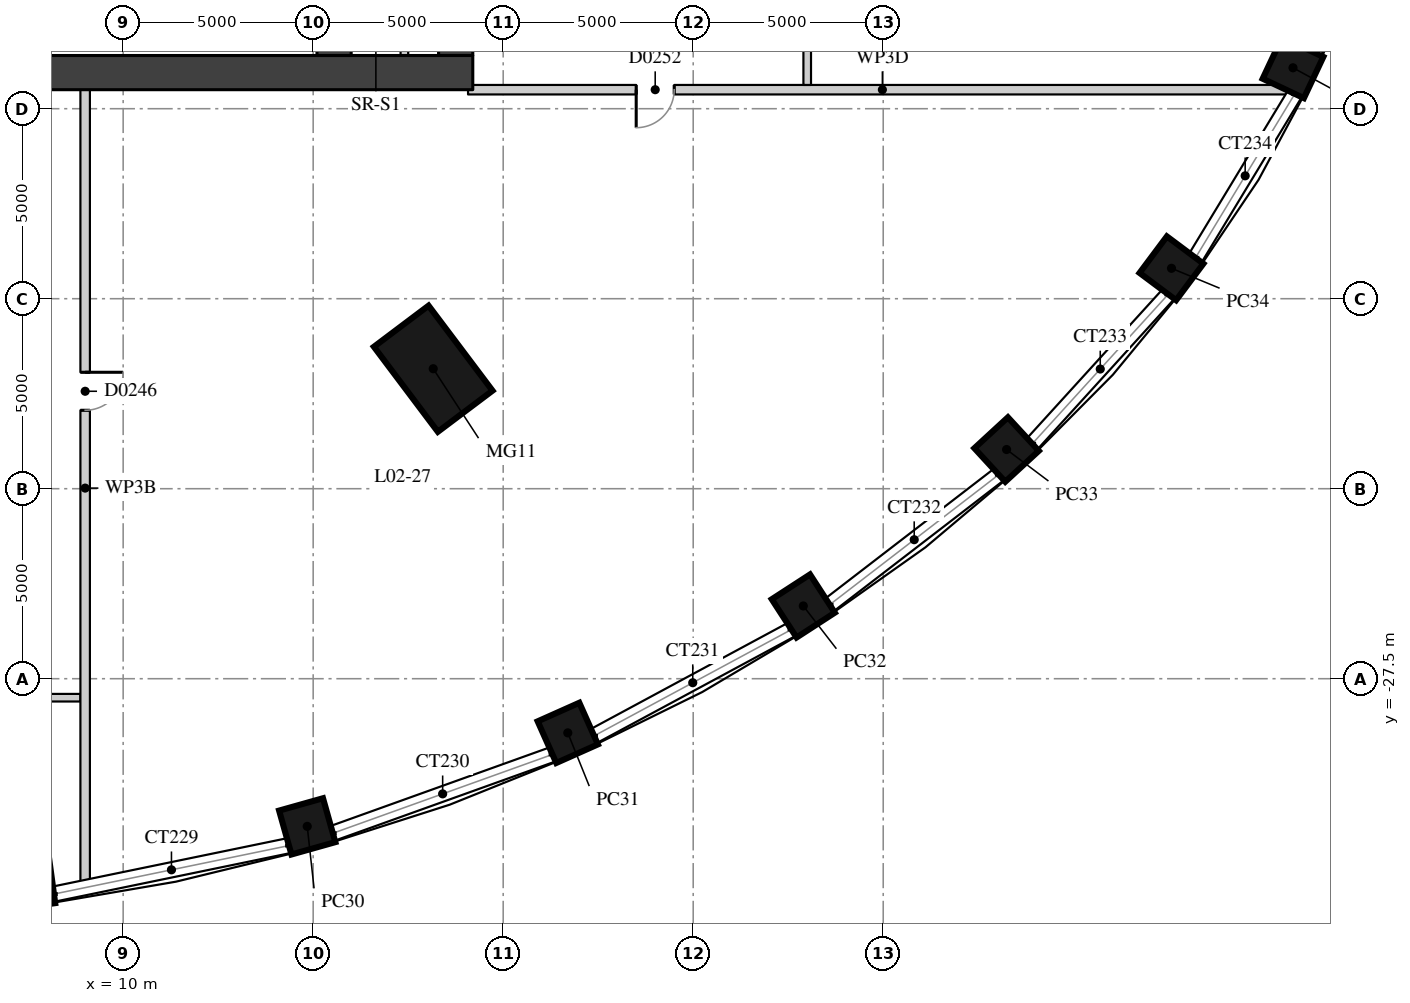
"""IFC4 building model, lengths in metres.
Left out: names, types, materials, properties, quantities, classifications, styles, units other than length and angle.
Written with IfcOpenShell. Run it as: python <this file> out.ifc"""

import sys

from ifc_helpers import new_model, si_unit, direction, frame, frame_2d, origin, origin_2d, place, context, subcontext, project, spatial, rectangle, extrude, element, fill, save


model = new_model("IFC4")
c1 = context("Model", 3, precision=1e-05, world=origin(), true_north=direction((0.0, 1.0)))
c2 = subcontext(c1, "Body", "Model", "MODEL_VIEW")
j1 = project(units=[si_unit("LENGTHUNIT", "METRE"), si_unit("PLANEANGLEUNIT", "RADIAN")], contexts=[c1])
p1 = place(None, origin())
s1 = spatial("IfcSite", under=j1, at=p1, CompositionType="ELEMENT")
p2 = place(p1, origin())
s2 = spatial("IfcBuilding", under=s1, at=p2, CompositionType="ELEMENT")
p3 = place(p2, frame((0.0, 0.0, 12.5)))
s3 = spatial("IfcBuildingStorey", under=s2, at=p3, CompositionType="ELEMENT", Elevation=12.5)
p4 = place(p3, frame((18.159, -19.343, 0.0), z_axis=(0.0, 0.0, 1.0), x_axis=(0.601173783055, -0.79911831575, 0.0)))
e1 = element("IfcColumn", 1, at=p4, inside=s3, PredefinedType="COLUMN", context=c2, shape_type="SweptSolid", body=[
    extrude(rectangle(XDim=2.8, YDim=1.8, at=origin_2d()), origin(), (0.0, 0.0, 1.0), 5.0),
])
for number, where, z_axis, x_axis in (
    (2, (7.536, -32.893, 0.0), (0.0, 0.0, 1.0), (0.135, -0.991, 0.0)),
    (3, (14.844, -31.386, 0.0), (0.0, 0.0, 1.0), (0.271, -0.963, 0.0)),
    (4, (21.7, -28.925, 0.0), (0.0, 0.0, 1.0), (0.407, -0.913, 0.0)),
    (5, (27.897, -25.586, 0.0), (0.0, 0.0, 1.0), (0.544, -0.839, 0.0)),
    (6, (33.246, -21.469, 0.0), (0.0, 0.0, 1.0), (0.677, -0.736, 0.0)),
    (7, (37.585, -16.7, 0.0), (0.0, 0.0, 1.0), (0.801, -0.599, 0.0)),
    (8, (40.783, -11.424, 0.0), (0.0, 0.0, 1.0), (0.905, -0.426, 0.0)),
):
    element("IfcColumn", number, at=place(p3, frame(where, z_axis=z_axis, x_axis=x_axis)), inside=s3, PredefinedType="COLUMN", context=c2, shape_type="SweptSolid", body=[
        extrude(rectangle(XDim=1.2, YDim=1.2, at=origin_2d()), origin(), (0.0, 0.0, 1.0), 5.0),
    ])
p5 = place(p3, frame((18.75, -11.1, 0.0), z_axis=(0.0, 0.0, 1.0), x_axis=(0.0, 1.0, 0.0)))
e9 = element("IfcWall", 9, at=p5, inside=s3, PredefinedType="SHEAR", context=c2, shape_type="SweptSolid", body=[
    extrude(rectangle(XDim=22.2, YDim=0.9, at=frame_2d((11.1, 0.0))), origin(), (0.0, 0.0, 1.0), 4.65),
])
p6 = place(p3, frame((4.0, -11.55, 0.0), z_axis=(0.0, 0.0, 1.0), x_axis=(1.0, 0.0, 0.0)))
e10 = element("IfcWall", 10, at=p6, inside=s3, PredefinedType="SHEAR", context=c2, shape_type="SweptSolid", body=[
    extrude(rectangle(XDim=15.2, YDim=0.9, at=frame_2d((7.6, 0.0))), origin(), (0.0, 0.0, 1.0), 4.65),
])
p7 = place(p3, frame((15.55, -11.1, 0.0), z_axis=(0.0, 0.0, 1.0), x_axis=(0.0, 1.0, 0.0)))
e11 = element("IfcWall", 11, at=p7, inside=s3, PredefinedType="SHEAR", context=c2, shape_type="SweptSolid", body=[
    extrude(rectangle(XDim=22.2, YDim=0.9, at=frame_2d((11.1, 0.0))), origin(), (0.0, 0.0, 1.0), 4.65),
])
p8 = place(p7, frame((15.6, 0.0, 0.0)))
e12 = element("IfcOpeningElement", 12, at=p8, cuts=e11, PredefinedType="OPENING", context=c2, shape_type="SweptSolid", body=[
    extrude(rectangle(XDim=1.0, YDim=2.1, at=frame_2d((0.5, 1.05))), frame((0.0, 0.46, 0.0), z_axis=(0.0, -1.0, 0.0), x_axis=(1.0, 0.0, 0.0)), (0.0, 0.0, 1.0), 0.92),
])
p9 = place(p7, frame((5.6, 0.0, 0.0)))
e13 = element("IfcOpeningElement", 13, at=p9, cuts=e11, PredefinedType="OPENING", context=c2, shape_type="SweptSolid", body=[
    extrude(rectangle(XDim=1.0, YDim=2.1, at=frame_2d((0.5, 1.05))), frame((0.0, 0.46, 0.0), z_axis=(0.0, -1.0, 0.0), x_axis=(1.0, 0.0, 0.0)), (0.0, 0.0, 1.0), 0.92),
])
p10 = place(p3, frame((17.4, -11.1, 0.0), z_axis=(0.0, 0.0, 1.0), x_axis=(0.0, 1.0, 0.0)))
e14 = element("IfcWall", 14, at=p10, inside=s3, PredefinedType="PARTITIONING", context=c2, shape_type="SweptSolid", body=[
    extrude(rectangle(XDim=4.2, YDim=0.2, at=frame_2d((2.1, 0.0))), origin(), (0.0, 0.0, 1.0), 4.65),
])
p11 = place(p3, frame((0.61, -28.0, 0.0), z_axis=(0.0, 0.0, 1.0), x_axis=(1.0, 0.0, 0.0)))
e15 = element("IfcWall", 15, at=p11, inside=s3, PredefinedType="PARTITIONING", context=c2, shape_type="SweptSolid", body=[
    extrude(rectangle(XDim=8.265, YDim=0.2, at=frame_2d((4.132, 0.0))), origin(), (0.0, 0.0, 1.0), 4.65),
])
p12 = place(p11, frame((3.633, 0.0, 0.0)))
e16 = element("IfcOpeningElement", 16, at=p12, cuts=e15, PredefinedType="OPENING", context=c2, shape_type="SweptSolid", body=[
    extrude(rectangle(XDim=1.0, YDim=2.1, at=frame_2d((0.5, 1.05))), frame((0.0, 0.11, 0.0), z_axis=(0.0, -1.0, 0.0), x_axis=(1.0, 0.0, 0.0)), (0.0, 0.0, 1.0), 0.22),
])
p13 = place(p3, frame((19.075, -12.0, 0.0), z_axis=(0.0, 0.0, 1.0), x_axis=(1.0, 0.0, 0.0)))
e17 = element("IfcWall", 17, at=p13, inside=s3, PredefinedType="PARTITIONING", context=c2, shape_type="SweptSolid", body=[
    extrude(rectangle(XDim=21.806, YDim=0.25, at=frame_2d((10.903, 0.0))), origin(), (0.0, 0.0, 1.0), 3.75),
])
p14 = place(p13, frame((4.425, 0.0, 0.0)))
e18 = element("IfcOpeningElement", 18, at=p14, cuts=e17, PredefinedType="OPENING", context=c2, shape_type="SweptSolid", body=[
    extrude(rectangle(XDim=1.0, YDim=2.1, at=frame_2d((0.5, 1.05))), frame((0.0, 0.135, 0.0), z_axis=(0.0, -1.0, 0.0), x_axis=(1.0, 0.0, 0.0)), (0.0, 0.0, 1.0), 0.27),
])
p15 = place(p3, frame((9.0, -32.97, 0.0), z_axis=(0.0, 0.0, 1.0), x_axis=(0.0, 1.0, 0.0)))
e19 = element("IfcWall", 19, at=p15, inside=s3, PredefinedType="PARTITIONING", context=c2, shape_type="SweptSolid", body=[
    extrude(rectangle(XDim=20.972, YDim=0.25, at=frame_2d((10.486, 0.0))), origin(), (0.0, 0.0, 1.0), 4.1),
])
p16 = place(p15, frame((12.534, 0.0, 0.0)))
e20 = element("IfcOpeningElement", 20, at=p16, cuts=e19, PredefinedType="OPENING", context=c2, shape_type="SweptSolid", body=[
    extrude(rectangle(XDim=1.0, YDim=2.1, at=frame_2d((0.5, 1.05))), frame((0.0, 0.135, 0.0), z_axis=(0.0, -1.0, 0.0), x_axis=(1.0, 0.0, 0.0)), (0.0, 0.0, 1.0), 0.27),
])
p17 = place(p3, frame((28.0, -11.875, 0.0), z_axis=(0.0, 0.0, 1.0), x_axis=(0.0, 1.0, 0.0)))
e21 = element("IfcWall", 21, at=p17, inside=s3, PredefinedType="PARTITIONING", context=c2, shape_type="SweptSolid", body=[
    extrude(rectangle(XDim=3.198, YDim=0.2, at=frame_2d((1.599, 0.0))), origin(), (0.0, 0.0, 1.0), 4.65),
])
p18 = place(p16, origin())
e22 = element("IfcDoor", 22, at=p18, inside=s3, OperationType="SINGLE_SWING_LEFT", PredefinedType="DOOR", context=c2, shape_type="SweptSolid", body=[
    extrude(rectangle(XDim=1.0, YDim=2.1, at=frame_2d((0.5, 1.05))), frame((0.0, 0.025, 0.0), z_axis=(0.0, -1.0, 0.0), x_axis=(1.0, 0.0, 0.0)), (0.0, 0.0, 1.0), 0.05),
])
fill(e20, e22)
p19 = place(p14, origin())
e23 = element("IfcDoor", 23, at=p19, inside=s3, OperationType="SINGLE_SWING_RIGHT", PredefinedType="DOOR", context=c2, shape_type="SweptSolid", body=[
    extrude(rectangle(XDim=1.0, YDim=2.1, at=frame_2d((0.5, 1.05))), frame((0.0, 0.025, 0.0), z_axis=(0.0, -1.0, 0.0), x_axis=(1.0, 0.0, 0.0)), (0.0, 0.0, 1.0), 0.05),
])
fill(e18, e23)
save(model, sys.argv[1])
